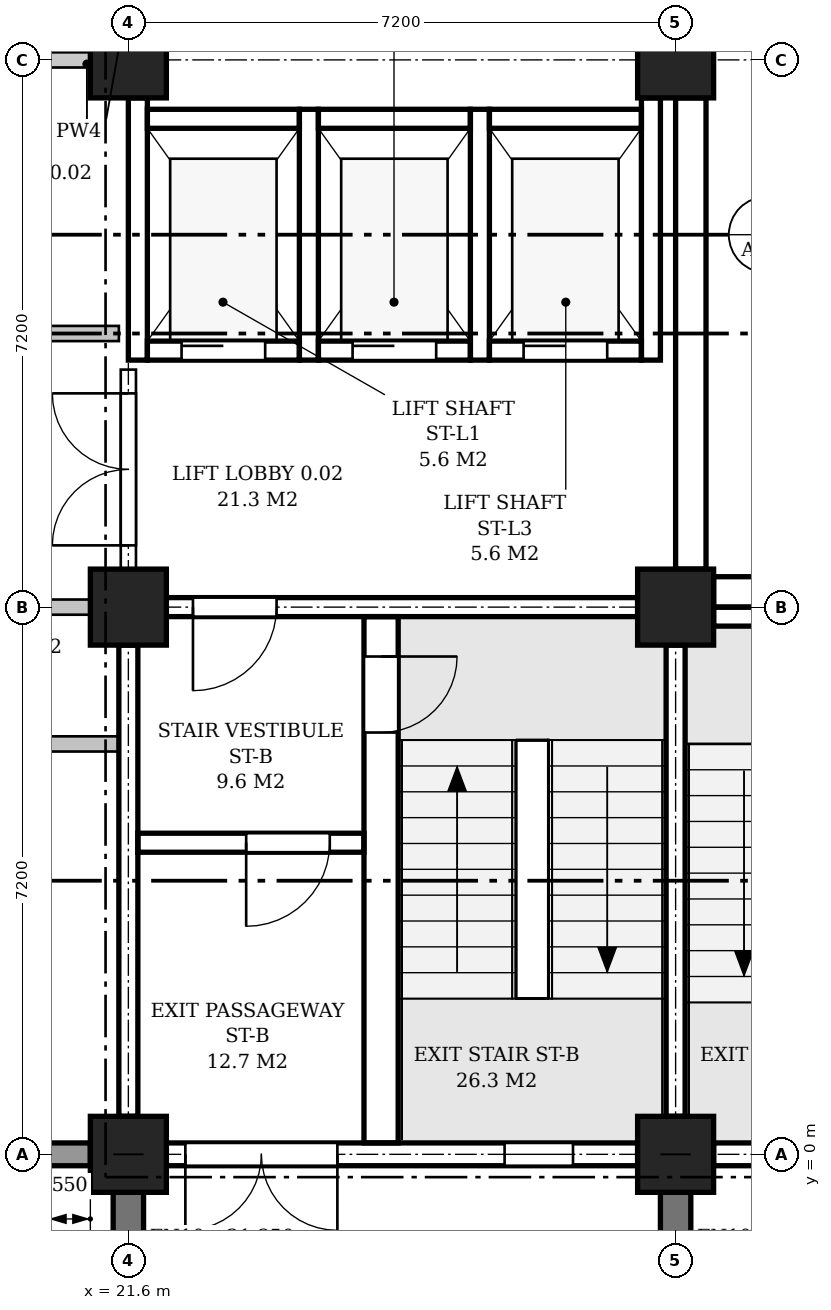
"""IFC4 building model, lengths in metres.
Left out: names, types, materials, properties, quantities, classifications, styles, units other than length and angle.
Written with IfcOpenShell. Run it as: python <this file> out.ifc"""

import sys

from ifc_helpers import new_model, si_unit, direction, frame, frame_2d, origin, origin_2d, place, context, subcontext, project, spatial, polyline, rectangle, outline, extrude, element, fill, save


model = new_model("IFC4")
c1 = context("Model", 3, precision=1e-05, world=origin(), true_north=direction((0.0, 1.0)))
c2 = subcontext(c1, "Body", "Model", "MODEL_VIEW")
j1 = project(units=[si_unit("LENGTHUNIT", "METRE"), si_unit("PLANEANGLEUNIT", "RADIAN")], contexts=[c1])
p1 = place(None, origin())
s1 = spatial("IfcSite", under=j1, at=p1, CompositionType="ELEMENT")
p2 = place(p1, origin())
s2 = spatial("IfcBuilding", under=s1, at=p2, CompositionType="ELEMENT")
p3 = place(p2, origin())
s3 = spatial("IfcBuildingStorey", under=s2, at=p3, CompositionType="ELEMENT", Elevation=0.0)
for number, where, z_axis, x_axis in (
    (1, (21.6, 0.0, 0.0), (0.0, 0.0, 1.0), (1.0, 0.0, 0.0)),
    (2, (21.6, 7.2, 0.0), (0.0, 0.0, 1.0), (1.0, 0.0, 0.0)),
    (3, (21.6, 14.4, 0.0), (0.0, 0.0, 1.0), (1.0, 0.0, 0.0)),
    (4, (28.8, 0.0, 0.0), (0.0, 0.0, 1.0), (1.0, 0.0, 0.0)),
    (5, (28.8, 7.2, 0.0), (0.0, 0.0, 1.0), (1.0, 0.0, 0.0)),
    (6, (28.8, 14.4, 0.0), (0.0, 0.0, 1.0), (1.0, 0.0, 0.0)),
):
    element("IfcColumn", number, at=place(p3, frame(where, z_axis=z_axis, x_axis=x_axis)), inside=s3, PredefinedType="COLUMN", context=c2, shape_type="SweptSolid", body=[
        extrude(rectangle(XDim=1.0, YDim=1.0, at=origin_2d()), origin(), (0.0, 0.0, 1.0), 6.0),
    ])
p4 = place(p3, frame((14.9, 0.0, 0.0), z_axis=(0.0, 0.0, 1.0), x_axis=(1.0, 0.0, 0.0)))
e7 = element("IfcWall", 7, at=p4, inside=s3, PredefinedType="STANDARD", context=c2, shape_type="SweptSolid", body=[
    extrude(rectangle(XDim=6.2, YDim=0.3, at=frame_2d((3.1, 0.0))), origin(), (0.0, 0.0, 1.0), 5.15),
])
p5 = place(p4, frame((0.55, 0.0, 0.9)))
e8 = element("IfcOpeningElement", 8, at=p5, cuts=e7, PredefinedType="OPENING", context=c2, shape_type="SweptSolid", body=[
    extrude(outline(polyline([(0.0, 0.0), (1.5, 0.0), (1.5, 3.25), (0.75, 4.0), (0.0, 3.25), (0.0, 0.0)])), frame((0.0, 0.16, 0.0), z_axis=(0.0, -1.0, 0.0), x_axis=(1.0, 0.0, 0.0)), (0.0, 0.0, 1.0), 0.32),
])
p6 = place(p4, frame((4.15, 0.0, 0.9)))
e9 = element("IfcOpeningElement", 9, at=p6, cuts=e7, PredefinedType="OPENING", context=c2, shape_type="SweptSolid", body=[
    extrude(outline(polyline([(0.0, 0.0), (1.5, 0.0), (1.5, 3.25), (0.75, 4.0), (0.0, 3.25), (0.0, 0.0)])), frame((0.0, 0.16, 0.0), z_axis=(0.0, -1.0, 0.0), x_axis=(1.0, 0.0, 0.0)), (0.0, 0.0, 1.0), 0.32),
])
p7 = place(p3, frame((22.1, 0.0, 0.0), z_axis=(0.0, 0.0, 1.0), x_axis=(1.0, 0.0, 0.0)))
e10 = element("IfcWall", 10, at=p7, inside=s3, PredefinedType="STANDARD", context=c2, shape_type="SweptSolid", body=[
    extrude(rectangle(XDim=6.2, YDim=0.3, at=frame_2d((3.1, 0.0))), origin(), (0.0, 0.0, 1.0), 5.15),
])
p8 = place(p7, frame((0.25, 0.0, 0.0)))
e11 = element("IfcOpeningElement", 11, at=p8, cuts=e10, PredefinedType="OPENING", context=c2, shape_type="SweptSolid", body=[
    extrude(rectangle(XDim=2.0, YDim=2.1, at=frame_2d((1.0, 1.05))), frame((0.0, 0.16, 0.0), z_axis=(0.0, -1.0, 0.0), x_axis=(1.0, 0.0, 0.0)), (0.0, 0.0, 1.0), 0.32),
])
p9 = place(p7, frame((4.45, 0.0, 0.9)))
e12 = element("IfcOpeningElement", 12, at=p9, cuts=e10, PredefinedType="OPENING", context=c2, shape_type="SweptSolid", body=[
    extrude(outline(polyline([(0.0, 0.0), (0.9, 0.0), (0.9, 3.55), (0.45, 4.0), (0.0, 3.55), (0.0, 0.0)])), frame((0.0, 0.16, 0.0), z_axis=(0.0, -1.0, 0.0), x_axis=(1.0, 0.0, 0.0)), (0.0, 0.0, 1.0), 0.32),
])
p10 = place(p3, frame((29.3, 0.0, 0.0), z_axis=(0.0, 0.0, 1.0), x_axis=(1.0, 0.0, 0.0)))
e13 = element("IfcWall", 13, at=p10, inside=s3, PredefinedType="STANDARD", context=c2, shape_type="SweptSolid", body=[
    extrude(rectangle(XDim=6.275, YDim=0.3, at=frame_2d((3.137, 0.0))), origin(), (0.0, 0.0, 1.0), 5.15),
])
p11 = place(p10, frame((4.025, 0.0, 0.0)))
e14 = element("IfcOpeningElement", 14, at=p11, cuts=e13, PredefinedType="OPENING", context=c2, shape_type="SweptSolid", body=[
    extrude(rectangle(XDim=2.0, YDim=2.1, at=frame_2d((1.0, 1.05))), frame((0.0, 0.16, 0.0), z_axis=(0.0, -1.0, 0.0), x_axis=(1.0, 0.0, 0.0)), (0.0, 0.0, 1.0), 0.32),
])
p12 = place(p10, frame((0.85, 0.0, 0.9)))
e15 = element("IfcOpeningElement", 15, at=p12, cuts=e13, PredefinedType="OPENING", context=c2, shape_type="SweptSolid", body=[
    extrude(outline(polyline([(0.0, 0.0), (0.9, 0.0), (0.9, 3.55), (0.45, 4.0), (0.0, 3.55), (0.0, 0.0)])), frame((0.0, 0.16, 0.0), z_axis=(0.0, -1.0, 0.0), x_axis=(1.0, 0.0, 0.0)), (0.0, 0.0, 1.0), 0.32),
])
for number, where, z_axis, x_axis in (
    (16, (21.6, -0.5, 0.0), (0.0, 0.0, 1.0), (0.0, -1.0, 0.0)),
    (17, (28.8, -0.5, 0.0), (0.0, 0.0, 1.0), (0.0, -1.0, 0.0)),
):
    element("IfcWall", number, at=place(p3, frame(where, z_axis=z_axis, x_axis=x_axis)), inside=s3, PredefinedType="POLYGONAL", context=c2, shape_type="SweptSolid", body=[
        extrude(outline(polyline([(1.2, 0.0), (1.2, 20.825), (0.85, 21.35), (0.0, 21.35), (0.0, 0.0), (1.2, 0.0)])), frame((0.0, 0.2, 0.0), z_axis=(0.0, -1.0, 0.0), x_axis=(1.0, 0.0, 0.0)), (0.0, 0.0, 1.0), 0.4),
    ])
p13 = place(p3, frame((29.3, 7.075, 0.0), z_axis=(0.0, 0.0, 1.0), x_axis=(1.0, 0.0, 0.0)))
e18 = element("IfcWall", 18, at=p13, inside=s3, PredefinedType="SHEAR", context=c2, shape_type="SweptSolid", body=[
    extrude(rectangle(XDim=6.275, YDim=0.25, at=frame_2d((3.137, 0.0))), origin(), (0.0, 0.0, 1.0), 5.05),
])
p14 = place(p3, frame((28.8, 0.5, -0.3), z_axis=(0.0, 0.0, 1.0), x_axis=(0.0, 1.0, 0.0)))
e19 = element("IfcWall", 19, at=p14, inside=s3, PredefinedType="SHEAR", context=c2, shape_type="SweptSolid", body=[
    extrude(rectangle(XDim=6.2, YDim=0.25, at=frame_2d((3.1, 0.0))), origin(), (0.0, 0.0, 1.0), 5.3),
])
p15 = place(p3, frame((22.1, 7.2, 0.0), z_axis=(0.0, 0.0, 1.0), x_axis=(1.0, 0.0, 0.0)))
e20 = element("IfcWall", 20, at=p15, inside=s3, PredefinedType="SHEAR", context=c2, shape_type="SweptSolid", body=[
    extrude(rectangle(XDim=6.2, YDim=0.25, at=frame_2d((3.1, 0.0))), origin(), (0.0, 0.0, 1.0), 5.0),
])
p16 = place(p15, frame((0.35, 0.0, 0.0)))
e21 = element("IfcOpeningElement", 21, at=p16, cuts=e20, PredefinedType="OPENING", context=c2, shape_type="SweptSolid", body=[
    extrude(rectangle(XDim=1.1, YDim=2.1, at=frame_2d((0.55, 1.05))), frame((0.0, 0.135, 0.0), z_axis=(0.0, -1.0, 0.0), x_axis=(1.0, 0.0, 0.0)), (0.0, 0.0, 1.0), 0.27),
])
p17 = place(p3, frame((21.6, 0.5, 0.0), z_axis=(0.0, 0.0, 1.0), x_axis=(0.0, 1.0, 0.0)))
e22 = element("IfcWall", 22, at=p17, inside=s3, PredefinedType="SHEAR", context=c2, shape_type="SweptSolid", body=[
    extrude(rectangle(XDim=6.2, YDim=0.25, at=frame_2d((3.1, 0.0))), origin(), (0.0, 0.0, 1.0), 5.0),
])
p18 = place(p3, frame((24.925, 0.15, 0.0), z_axis=(0.0, 0.0, 1.0), x_axis=(0.0, 1.0, 0.0)))
e23 = element("IfcWall", 23, at=p18, inside=s3, PredefinedType="SHEAR", context=c2, shape_type="SweptSolid", body=[
    extrude(rectangle(XDim=6.925, YDim=0.45, at=frame_2d((3.462, 0.0))), origin(), (0.0, 0.0, 1.0), 5.75),
])
p19 = place(p18, frame((5.4, 0.0, 0.0)))
e24 = element("IfcOpeningElement", 24, at=p19, cuts=e23, PredefinedType="OPENING", context=c2, shape_type="SweptSolid", body=[
    extrude(rectangle(XDim=1.0, YDim=2.1, at=frame_2d((0.5, 1.05))), frame((0.0, 0.235, 0.0), z_axis=(0.0, -1.0, 0.0), x_axis=(1.0, 0.0, 0.0)), (0.0, 0.0, 1.0), 0.47),
])
p20 = place(p3, frame((21.725, 4.1, 0.0), z_axis=(0.0, 0.0, 1.0), x_axis=(1.0, 0.0, 0.0)))
e25 = element("IfcWall", 25, at=p20, inside=s3, PredefinedType="SHEAR", context=c2, shape_type="SweptSolid", body=[
    extrude(rectangle(XDim=2.975, YDim=0.25, at=frame_2d((1.487, 0.0))), origin(), (0.0, 0.0, 1.0), 5.75),
])
p21 = place(p20, frame((1.425, 0.0, 0.0)))
e26 = element("IfcOpeningElement", 26, at=p21, cuts=e25, PredefinedType="OPENING", context=c2, shape_type="SweptSolid", body=[
    extrude(rectangle(XDim=1.1, YDim=2.1, at=frame_2d((0.55, 1.05))), frame((0.0, 0.135, 0.0), z_axis=(0.0, -1.0, 0.0), x_axis=(1.0, 0.0, 0.0)), (0.0, 0.0, 1.0), 0.27),
])
p22 = place(p3, frame((21.725, 10.45, -0.3), z_axis=(0.0, 0.0, 1.0), x_axis=(0.0, 1.0, 0.0)))
e27 = element("IfcWall", 27, at=p22, inside=s3, PredefinedType="SHEAR", context=c2, shape_type="SweptSolid", body=[
    extrude(rectangle(XDim=3.45, YDim=0.25, at=frame_2d((1.725, 0.0))), origin(), (0.0, 0.0, 1.0), 5.3),
])
for number, where, z_axis, x_axis in (
    (28, (23.975, 10.45, -0.3), (0.0, 0.0, 1.0), (0.0, 1.0, 0.0)),
    (29, (26.225, 10.45, -0.3), (0.0, 0.0, 1.0), (0.0, 1.0, 0.0)),
):
    element("IfcWall", number, at=place(p3, frame(where, z_axis=z_axis, x_axis=x_axis)), inside=s3, PredefinedType="SHEAR", context=c2, shape_type="SweptSolid", body=[
        extrude(rectangle(XDim=3.3, YDim=0.25, at=frame_2d((1.65, 0.0))), origin(), (0.0, 0.0, 1.0), 6.05),
    ])
p23 = place(p3, frame((28.475, 10.45, -0.3), z_axis=(0.0, 0.0, 1.0), x_axis=(0.0, 1.0, 0.0)))
e30 = element("IfcWall", 30, at=p23, inside=s3, PredefinedType="SHEAR", context=c2, shape_type="SweptSolid", body=[
    extrude(rectangle(XDim=3.45, YDim=0.25, at=frame_2d((1.725, 0.0))), origin(), (0.0, 0.0, 1.0), 5.35),
])
p24 = place(p3, frame((21.85, 10.575, -0.3), z_axis=(0.0, 0.0, 1.0), x_axis=(1.0, 0.0, 0.0)))
e31 = element("IfcWall", 31, at=p24, inside=s3, PredefinedType="SHEAR", context=c2, shape_type="SweptSolid", body=[
    extrude(rectangle(XDim=2.0, YDim=0.25, at=frame_2d((1.0, 0.0))), origin(), (0.0, 0.0, 1.0), 6.05),
])
p25 = place(p24, frame((0.45, 0.0, 0.3)))
e32 = element("IfcOpeningElement", 32, at=p25, cuts=e31, PredefinedType="OPENING", context=c2, shape_type="SweptSolid", body=[
    extrude(rectangle(XDim=1.1, YDim=2.1, at=frame_2d((0.55, 1.05))), frame((0.0, 0.135, 0.0), z_axis=(0.0, -1.0, 0.0), x_axis=(1.0, 0.0, 0.0)), (0.0, 0.0, 1.0), 0.27),
])
p26 = place(p3, frame((21.85, 13.625, -0.3), z_axis=(0.0, 0.0, 1.0), x_axis=(1.0, 0.0, 0.0)))
e33 = element("IfcWall", 33, at=p26, inside=s3, PredefinedType="SHEAR", context=c2, shape_type="SweptSolid", body=[
    extrude(rectangle(XDim=2.0, YDim=0.25, at=frame_2d((1.0, 0.0))), origin(), (0.0, 0.0, 1.0), 6.05),
])
p27 = place(p3, frame((24.1, 10.575, -0.3), z_axis=(0.0, 0.0, 1.0), x_axis=(1.0, 0.0, 0.0)))
e34 = element("IfcWall", 34, at=p27, inside=s3, PredefinedType="SHEAR", context=c2, shape_type="SweptSolid", body=[
    extrude(rectangle(XDim=2.0, YDim=0.25, at=frame_2d((1.0, 0.0))), origin(), (0.0, 0.0, 1.0), 6.05),
])
p28 = place(p27, frame((0.45, 0.0, 0.3)))
e35 = element("IfcOpeningElement", 35, at=p28, cuts=e34, PredefinedType="OPENING", context=c2, shape_type="SweptSolid", body=[
    extrude(rectangle(XDim=1.1, YDim=2.1, at=frame_2d((0.55, 1.05))), frame((0.0, 0.135, 0.0), z_axis=(0.0, -1.0, 0.0), x_axis=(1.0, 0.0, 0.0)), (0.0, 0.0, 1.0), 0.27),
])
p29 = place(p3, frame((24.1, 13.625, -0.3), z_axis=(0.0, 0.0, 1.0), x_axis=(1.0, 0.0, 0.0)))
e36 = element("IfcWall", 36, at=p29, inside=s3, PredefinedType="SHEAR", context=c2, shape_type="SweptSolid", body=[
    extrude(rectangle(XDim=2.0, YDim=0.25, at=frame_2d((1.0, 0.0))), origin(), (0.0, 0.0, 1.0), 6.05),
])
p30 = place(p3, frame((26.35, 10.575, -0.3), z_axis=(0.0, 0.0, 1.0), x_axis=(1.0, 0.0, 0.0)))
e37 = element("IfcWall", 37, at=p30, inside=s3, PredefinedType="SHEAR", context=c2, shape_type="SweptSolid", body=[
    extrude(rectangle(XDim=2.0, YDim=0.25, at=frame_2d((1.0, 0.0))), origin(), (0.0, 0.0, 1.0), 6.05),
])
p31 = place(p30, frame((0.45, 0.0, 0.3)))
e38 = element("IfcOpeningElement", 38, at=p31, cuts=e37, PredefinedType="OPENING", context=c2, shape_type="SweptSolid", body=[
    extrude(rectangle(XDim=1.1, YDim=2.1, at=frame_2d((0.55, 1.05))), frame((0.0, 0.135, 0.0), z_axis=(0.0, -1.0, 0.0), x_axis=(1.0, 0.0, 0.0)), (0.0, 0.0, 1.0), 0.27),
])
p32 = place(p3, frame((26.35, 13.625, -0.3), z_axis=(0.0, 0.0, 1.0), x_axis=(1.0, 0.0, 0.0)))
e39 = element("IfcWall", 39, at=p32, inside=s3, PredefinedType="SHEAR", context=c2, shape_type="SweptSolid", body=[
    extrude(rectangle(XDim=2.0, YDim=0.25, at=frame_2d((1.0, 0.0))), origin(), (0.0, 0.0, 1.0), 6.05),
])
p33 = place(p3, frame((14.5, 5.4, 0.0), z_axis=(0.0, 0.0, 1.0), x_axis=(1.0, 0.0, 0.0)))
e40 = element("IfcWall", 40, at=p33, inside=s3, PredefinedType="PARTITIONING", context=c2, shape_type="SweptSolid", body=[
    extrude(outline(polyline([(0.0, 0.0), (6.975, 0.0), (6.975, 5.0), (6.85, 5.0), (6.85, 5.75), (0.15, 5.75), (0.15, 5.0), (0.0, 5.0), (0.0, 0.0)])), frame((0.0, 0.1, 0.0), z_axis=(0.0, -1.0, 0.0), x_axis=(1.0, 0.0, 0.0)), (0.0, 0.0, 1.0), 0.2),
])
p34 = place(p33, frame((1.25, 0.0, 0.0)))
e41 = element("IfcOpeningElement", 41, at=p34, cuts=e40, PredefinedType="OPENING", context=c2, shape_type="SweptSolid", body=[
    extrude(rectangle(XDim=1.0, YDim=2.1, at=frame_2d((0.5, 1.05))), frame((0.0, 0.11, 0.0), z_axis=(0.0, -1.0, 0.0), x_axis=(1.0, 0.0, 0.0)), (0.0, 0.0, 1.0), 0.22),
])
p35 = place(p33, frame((4.738, 0.0, 0.0)))
e42 = element("IfcOpeningElement", 42, at=p35, cuts=e40, PredefinedType="OPENING", context=c2, shape_type="SweptSolid", body=[
    extrude(rectangle(XDim=1.0, YDim=2.1, at=frame_2d((0.5, 1.05))), frame((0.0, 0.11, 0.0), z_axis=(0.0, -1.0, 0.0), x_axis=(1.0, 0.0, 0.0)), (0.0, 0.0, 1.0), 0.22),
])
p36 = place(p3, frame((14.9, 7.2, 0.0), z_axis=(0.0, 0.0, 1.0), x_axis=(1.0, 0.0, 0.0)))
e43 = element("IfcWall", 43, at=p36, inside=s3, PredefinedType="PARTITIONING", context=c2, shape_type="SweptSolid", body=[
    extrude(rectangle(XDim=6.2, YDim=0.2, at=frame_2d((3.1, 0.0))), origin(), (0.0, 0.0, 1.0), 5.0),
])
p37 = place(p36, frame((2.6, 0.0, 0.0)))
e44 = element("IfcOpeningElement", 44, at=p37, cuts=e43, PredefinedType="OPENING", context=c2, shape_type="SweptSolid", body=[
    extrude(rectangle(XDim=1.0, YDim=2.1, at=frame_2d((0.5, 1.05))), frame((0.0, 0.11, 0.0), z_axis=(0.0, -1.0, 0.0), x_axis=(1.0, 0.0, 0.0)), (0.0, 0.0, 1.0), 0.22),
])
p38 = place(p3, frame((29.3, 7.4, 0.0), z_axis=(0.0, 0.0, 1.0), x_axis=(1.0, 0.0, 0.0)))
e45 = element("IfcWall", 45, at=p38, inside=s3, PredefinedType="SOLIDWALL", context=c2, shape_type="SweptSolid", body=[
    extrude(rectangle(XDim=6.275, YDim=0.4, at=frame_2d((3.137, 0.0))), origin(), (0.0, 0.0, 1.0), 10.7),
])
p39 = place(p3, frame((17.9, 10.8, 0.0), z_axis=(0.0, 0.0, 1.0), x_axis=(1.0, 0.0, 0.0)))
e46 = element("IfcWall", 46, at=p39, inside=s3, PredefinedType="PARTITIONING", context=c2, shape_type="SweptSolid", body=[
    extrude(outline(polyline([(0.0, 0.0), (3.575, 0.0), (3.575, 5.0), (3.45, 5.0), (3.45, 5.75), (0.0, 5.75), (0.0, 0.0)])), frame((0.0, 0.1, 0.0), z_axis=(0.0, -1.0, 0.0), x_axis=(1.0, 0.0, 0.0)), (0.0, 0.0, 1.0), 0.2),
])
p40 = place(p39, frame((1.338, 0.0, 0.0)))
e47 = element("IfcOpeningElement", 47, at=p40, cuts=e46, PredefinedType="OPENING", context=c2, shape_type="SweptSolid", body=[
    extrude(rectangle(XDim=1.0, YDim=2.1, at=frame_2d((0.5, 1.05))), frame((0.0, 0.11, 0.0), z_axis=(0.0, -1.0, 0.0), x_axis=(1.0, 0.0, 0.0)), (0.0, 0.0, 1.0), 0.22),
])
p41 = place(p3, frame((18.1, 14.4, 0.0), z_axis=(0.0, 0.0, 1.0), x_axis=(1.0, 0.0, 0.0)))
e48 = element("IfcWall", 48, at=p41, inside=s3, PredefinedType="PARTITIONING", context=c2, shape_type="SweptSolid", body=[
    extrude(rectangle(XDim=3.0, YDim=0.2, at=frame_2d((1.5, 0.0))), origin(), (0.0, 0.0, 1.0), 5.0),
])
p42 = place(p3, frame((21.6, 7.7, 0.0), z_axis=(0.0, 0.0, 1.0), x_axis=(0.0, 1.0, 0.0)))
e49 = element("IfcWall", 49, at=p42, inside=s3, PredefinedType="PARTITIONING", context=c2, shape_type="SweptSolid", body=[
    extrude(rectangle(XDim=2.625, YDim=0.2, at=frame_2d((1.312, 0.0))), origin(), (0.0, 0.0, 1.0), 5.0),
])
p43 = place(p42, frame((0.312, 0.0, 0.0)))
e50 = element("IfcOpeningElement", 50, at=p43, cuts=e49, PredefinedType="OPENING", context=c2, shape_type="SweptSolid", body=[
    extrude(rectangle(XDim=2.0, YDim=2.4, at=frame_2d((1.0, 1.2))), frame((0.0, 0.11, 0.0), z_axis=(0.0, -1.0, 0.0), x_axis=(1.0, 0.0, 0.0)), (0.0, 0.0, 1.0), 0.22),
])
p44 = place(p3, frame((29.0, 7.7, 0.0), z_axis=(0.0, 0.0, 1.0), x_axis=(0.0, 1.0, 0.0)))
e51 = element("IfcWall", 51, at=p44, inside=s3, PredefinedType="SOLIDWALL", context=c2, shape_type="SweptSolid", body=[
    extrude(rectangle(XDim=6.2, YDim=0.4, at=frame_2d((3.1, 0.0))), origin(), (0.0, 0.0, 1.0), 10.55),
])
p45 = place(p8, frame((2.0, 0.0, 0.0), z_axis=(0.0, 0.0, 1.0), x_axis=(-1.0, 0.0, 0.0)))
e52 = element("IfcDoor", 52, at=p45, inside=s3, OperationType="DOUBLE_DOOR_SINGLE_SWING", PredefinedType="DOOR", context=c2, shape_type="SweptSolid", body=[
    extrude(rectangle(XDim=2.0, YDim=2.1, at=frame_2d((1.0, 1.05))), frame((0.0, 0.025, 0.0), z_axis=(0.0, -1.0, 0.0), x_axis=(1.0, 0.0, 0.0)), (0.0, 0.0, 1.0), 0.05),
])
fill(e11, e52)
p46 = place(p9, origin())
e53 = element("IfcWindow", 53, at=p46, inside=s3, PartitioningType="SINGLE_PANEL", PredefinedType="WINDOW", context=c2, shape_type="SweptSolid", body=[
    extrude(outline(polyline([(0.0, 0.0), (0.9, 0.0), (0.9, 3.55), (0.45, 4.0), (0.0, 3.55), (0.0, 0.0)])), frame((0.0, 0.03, 0.0), z_axis=(0.0, -1.0, 0.0), x_axis=(1.0, 0.0, 0.0)), (0.0, 0.0, 1.0), 0.06),
])
fill(e12, e53)
p47 = place(p19, frame((1.0, 0.0, 0.0), z_axis=(0.0, 0.0, 1.0), x_axis=(-1.0, 0.0, 0.0)))
e54 = element("IfcDoor", 54, at=p47, inside=s3, OperationType="SINGLE_SWING_LEFT", PredefinedType="DOOR", context=c2, shape_type="SweptSolid", body=[
    extrude(rectangle(XDim=1.0, YDim=2.1, at=frame_2d((0.5, 1.05))), frame((0.0, 0.025, 0.0), z_axis=(0.0, -1.0, 0.0), x_axis=(1.0, 0.0, 0.0)), (0.0, 0.0, 1.0), 0.05),
])
fill(e24, e54)
p48 = place(p16, frame((1.1, 0.0, 0.0), z_axis=(0.0, 0.0, 1.0), x_axis=(-1.0, 0.0, 0.0)))
e55 = element("IfcDoor", 55, at=p48, inside=s3, OperationType="SINGLE_SWING_RIGHT", PredefinedType="DOOR", context=c2, shape_type="SweptSolid", body=[
    extrude(rectangle(XDim=1.1, YDim=2.1, at=frame_2d((0.55, 1.05))), frame((0.0, 0.025, 0.0), z_axis=(0.0, -1.0, 0.0), x_axis=(1.0, 0.0, 0.0)), (0.0, 0.0, 1.0), 0.05),
])
fill(e21, e55)
p49 = place(p21, frame((1.1, 0.0, 0.0), z_axis=(0.0, 0.0, 1.0), x_axis=(-1.0, 0.0, 0.0)))
e56 = element("IfcDoor", 56, at=p49, inside=s3, OperationType="SINGLE_SWING_RIGHT", PredefinedType="DOOR", context=c2, shape_type="SweptSolid", body=[
    extrude(rectangle(XDim=1.1, YDim=2.1, at=frame_2d((0.55, 1.05))), frame((0.0, 0.025, 0.0), z_axis=(0.0, -1.0, 0.0), x_axis=(1.0, 0.0, 0.0)), (0.0, 0.0, 1.0), 0.05),
])
fill(e26, e56)
p50 = place(p25, origin())
e57 = element("IfcDoor", 57, at=p50, inside=s3, OperationType="SLIDING_TO_LEFT", PredefinedType="DOOR", context=c2, shape_type="SweptSolid", body=[
    extrude(rectangle(XDim=1.1, YDim=2.1, at=frame_2d((0.55, 1.05))), frame((0.0, 0.025, 0.0), z_axis=(0.0, -1.0, 0.0), x_axis=(1.0, 0.0, 0.0)), (0.0, 0.0, 1.0), 0.05),
])
fill(e32, e57)
p51 = place(p28, origin())
e58 = element("IfcDoor", 58, at=p51, inside=s3, OperationType="SLIDING_TO_LEFT", PredefinedType="DOOR", context=c2, shape_type="SweptSolid", body=[
    extrude(rectangle(XDim=1.1, YDim=2.1, at=frame_2d((0.55, 1.05))), frame((0.0, 0.025, 0.0), z_axis=(0.0, -1.0, 0.0), x_axis=(1.0, 0.0, 0.0)), (0.0, 0.0, 1.0), 0.05),
])
fill(e35, e58)
p52 = place(p31, origin())
e59 = element("IfcDoor", 59, at=p52, inside=s3, OperationType="SLIDING_TO_LEFT", PredefinedType="DOOR", context=c2, shape_type="SweptSolid", body=[
    extrude(rectangle(XDim=1.1, YDim=2.1, at=frame_2d((0.55, 1.05))), frame((0.0, 0.025, 0.0), z_axis=(0.0, -1.0, 0.0), x_axis=(1.0, 0.0, 0.0)), (0.0, 0.0, 1.0), 0.05),
])
fill(e38, e59)
p53 = place(p43, origin())
e60 = element("IfcDoor", 60, at=p53, inside=s3, OperationType="DOUBLE_DOOR_SINGLE_SWING", PredefinedType="DOOR", context=c2, shape_type="SweptSolid", body=[
    extrude(rectangle(XDim=2.0, YDim=2.4, at=frame_2d((1.0, 1.2))), frame((0.0, 0.025, 0.0), z_axis=(0.0, -1.0, 0.0), x_axis=(1.0, 0.0, 0.0)), (0.0, 0.0, 1.0), 0.05),
])
fill(e50, e60)
save(model, sys.argv[1])
